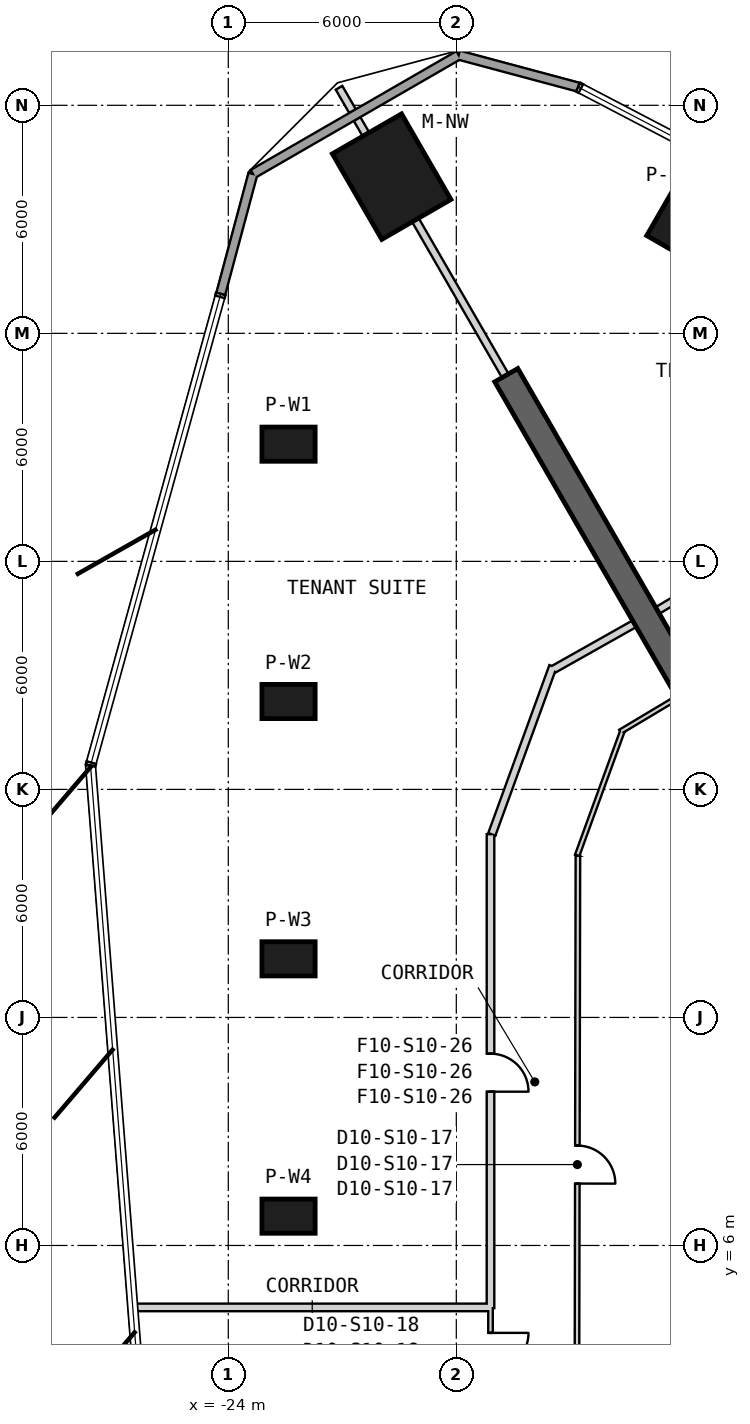
"""IFC4 building model, lengths in metres.
Left out: names, types, materials, properties, quantities, classifications, styles, units other than length and angle.
Written with IfcOpenShell. Run it as: python <this file> out.ifc"""

import sys

from ifc_helpers import new_model, si_unit, direction, frame, frame_2d, origin, origin_2d, place, context, subcontext, project, spatial, rectangle, extrude, element, fill, save


model = new_model("IFC4")
c1 = context("Model", 3, precision=1e-05, world=origin(), true_north=direction((0.0, 1.0)))
c2 = subcontext(c1, "Body", "Model", "MODEL_VIEW")
j1 = project(units=[si_unit("LENGTHUNIT", "METRE"), si_unit("PLANEANGLEUNIT", "RADIAN")], contexts=[c1])
p1 = place(None, origin())
s1 = spatial("IfcSite", under=j1, at=p1, CompositionType="ELEMENT")
p2 = place(p1, origin())
s2 = spatial("IfcBuilding", under=s1, at=p2, CompositionType="ELEMENT")
p3 = place(p2, frame((0.0, 0.0, 181.2)))
s3 = spatial("IfcBuildingStorey", under=s2, at=p3, CompositionType="ELEMENT", Elevation=181.2)
p4 = place(p3, frame((-19.701, 34.124, 0.0), z_axis=(0.0, 0.0, 1.0), x_axis=(-0.5, 0.866025403784, 0.0)))
e1 = element("IfcColumn", 1, at=p4, inside=s3, PredefinedType="COLUMN", context=c2, shape_type="SweptSolid", body=[
    extrude(rectangle(XDim=2.6, YDim=2.1, at=origin_2d()), origin(), (0.0, 0.0, 1.0), 4.0),
])
for number, where, z_axis, x_axis in (
    (2, (-22.415, 27.084, 0.0), (0.0, 0.0, 1.0), (-1.0, 0.0, 0.0)),
    (3, (-22.415, 20.313, 0.0), (0.0, 0.0, 1.0), (-1.0, 0.0, 0.0)),
    (4, (-22.415, 13.542, 0.0), (0.0, 0.0, 1.0), (-1.0, 0.0, 0.0)),
    (5, (-22.415, 6.771, 0.0), (0.0, 0.0, 1.0), (-1.0, 0.0, 0.0)),
    (6, (-12.248, 32.954, 0.0), (0.0, 0.0, 1.0), (0.5, 0.866, 0.0)),
):
    element("IfcColumn", number, at=place(p3, frame(where, z_axis=z_axis, x_axis=x_axis)), inside=s3, PredefinedType="COLUMN", context=c2, shape_type="SweptSolid", body=[
        extrude(rectangle(XDim=1.4, YDim=0.9, at=origin_2d()), origin(), (0.0, 0.0, 1.0), 4.0),
    ])
p5 = place(p3, frame((-10.575, 18.316, 0.0), z_axis=(0.0, 0.0, 1.0), x_axis=(-0.500002625756, 0.866023887798, 0.0)))
e7 = element("IfcWall", 7, at=p5, inside=s3, PredefinedType="SHEAR", context=c2, shape_type="SweptSolid", body=[
    extrude(rectangle(XDim=12.22, YDim=0.7, at=frame_2d((6.11, 0.0))), origin(), (0.0, 0.0, 1.0), 4.0),
])
p6 = place(p3, frame((-14.793, 36.479, 0.0), z_axis=(0.0, 0.0, 1.0), x_axis=(-0.965934328549, 0.258787312151, 0.0)))
e8 = element("IfcWall", 8, at=p6, inside=s3, PredefinedType="SOLIDWALL", context=c2, shape_type="SweptSolid", body=[
    extrude(rectangle(XDim=3.256, YDim=0.24, at=frame_2d((1.628, 0.0))), origin(), (0.0, 0.0, 1.0), 3.7),
])
p7 = place(p3, frame((-17.938, 37.322, 0.0), z_axis=(0.0, 0.0, 1.0), x_axis=(-0.866019130722, -0.500010865105, 0.0)))
e9 = element("IfcWall", 9, at=p7, inside=s3, PredefinedType="SOLIDWALL", context=c2, shape_type="SweptSolid", body=[
    extrude(rectangle(XDim=6.253, YDim=0.24, at=frame_2d((3.126, 0.0))), origin(), (0.0, 0.0, 1.0), 3.7),
])
p8 = place(p3, frame((-23.353, 34.195, 0.0), z_axis=(0.0, 0.0, 1.0), x_axis=(-0.258843094037, -0.965919382076, 0.0)))
e10 = element("IfcWall", 10, at=p8, inside=s3, PredefinedType="SOLIDWALL", context=c2, shape_type="SweptSolid", body=[
    extrude(rectangle(XDim=3.269, YDim=0.24, at=frame_2d((1.635, 0.0))), origin(), (0.0, 0.0, 1.0), 3.7),
])
p9 = place(p3, frame((-12.189, 20.411, 0.0), z_axis=(0.0, 0.0, 1.0), x_axis=(-0.858492721014, -0.51282574815, 0.0)))
e11 = element("IfcWall", 11, at=p9, inside=s3, PredefinedType="PARTITIONING", context=c2, shape_type="SweptSolid", body=[
    extrude(rectangle(XDim=1.742, YDim=0.12, at=frame_2d((0.871, 0.0))), origin(), (0.0, 0.0, 1.0), 3.7),
])
p10 = place(p3, frame((-13.631, 19.53, 0.0), z_axis=(0.0, 0.0, 1.0), x_axis=(-0.342069878069, -0.939674517329, 0.0)))
e12 = element("IfcWall", 12, at=p10, inside=s3, PredefinedType="PARTITIONING", context=c2, shape_type="SweptSolid", body=[
    extrude(rectangle(XDim=3.479, YDim=0.12, at=frame_2d((1.739, 0.0))), origin(), (0.0, 0.0, 1.0), 2.78),
])
p11 = place(p3, frame((-14.8, 16.257, 0.0), z_axis=(0.0, 0.0, 1.0), x_axis=(-0.001847148781, -0.999998294019, 0.0)))
e13 = element("IfcWall", 13, at=p11, inside=s3, PredefinedType="PARTITIONING", context=c2, shape_type="SweptSolid", body=[
    extrude(rectangle(XDim=16.257, YDim=0.12, at=frame_2d((8.128, 0.0))), origin(), (0.0, 0.0, 1.0), 2.88),
])
p12 = place(p11, frame((7.629, 0.0, 0.0)))
e14 = element("IfcOpeningElement", 14, at=p12, cuts=e13, PredefinedType="OPENING", context=c2, shape_type="SweptSolid", body=[
    extrude(rectangle(XDim=1.0, YDim=2.1, at=frame_2d((0.5, 1.05))), frame((0.0, 0.07, 0.0), z_axis=(0.0, -1.0, 0.0), x_axis=(1.0, 0.0, 0.0)), (0.0, 0.0, 1.0), 0.14),
])
p13 = place(p3, frame((-17.1, 4.35, 0.0), z_axis=(0.0, 0.0, 1.0), x_axis=(0.0, -1.0, 0.0)))
e15 = element("IfcWall", 15, at=p13, inside=s3, PredefinedType="PARTITIONING", context=c2, shape_type="SweptSolid", body=[
    extrude(rectangle(XDim=2.3, YDim=0.12, at=frame_2d((1.15, 0.0))), origin(), (0.0, 0.0, 1.0), 3.7),
])
p14 = place(p13, frame((0.65, 0.0, 0.0)))
e16 = element("IfcOpeningElement", 16, at=p14, cuts=e15, PredefinedType="OPENING", context=c2, shape_type="SweptSolid", body=[
    extrude(rectangle(XDim=1.0, YDim=2.1, at=frame_2d((0.5, 1.05))), frame((0.0, 0.07, 0.0), z_axis=(0.0, -1.0, 0.0), x_axis=(1.0, 0.0, 0.0)), (0.0, 0.0, 1.0), 0.14),
])
p15 = place(p3, frame((-17.1, 16.823, 0.0), z_axis=(0.0, 0.0, 1.0), x_axis=(0.0, -1.0, 0.0)))
e17 = element("IfcWall", 17, at=p15, inside=s3, PredefinedType="PARTITIONING", context=c2, shape_type="SweptSolid", body=[
    extrude(rectangle(XDim=12.473, YDim=0.2, at=frame_2d((6.236, 0.0))), origin(), (0.0, 0.0, 1.0), 2.88),
])
p16 = place(p15, frame((5.776, 0.0, 0.0)))
e18 = element("IfcOpeningElement", 18, at=p16, cuts=e17, PredefinedType="OPENING", context=c2, shape_type="SweptSolid", body=[
    extrude(rectangle(XDim=1.0, YDim=2.1, at=frame_2d((0.5, 1.05))), frame((0.0, 0.11, 0.0), z_axis=(0.0, -1.0, 0.0), x_axis=(1.0, 0.0, 0.0)), (0.0, 0.0, 1.0), 0.22),
])
p17 = place(p3, frame((-15.456, 21.239, 0.0), z_axis=(0.0, 0.0, 1.0), x_axis=(-0.34205546997, -0.939679762187, 0.0)))
e19 = element("IfcWall", 19, at=p17, inside=s3, PredefinedType="PARTITIONING", context=c2, shape_type="SweptSolid", body=[
    extrude(rectangle(XDim=4.706, YDim=0.2, at=frame_2d((2.353, 0.0))), origin(), (0.0, 0.0, 1.0), 2.78),
])
p18 = place(p3, frame((-13.313, 22.359, 0.0), z_axis=(0.0, 0.0, 1.0), x_axis=(-0.87121710687, -0.490897904555, 0.0)))
e20 = element("IfcWall", 20, at=p18, inside=s3, PredefinedType="PARTITIONING", context=c2, shape_type="SweptSolid", body=[
    extrude(rectangle(XDim=2.457, YDim=0.2, at=frame_2d((1.229, 0.0))), origin(), (0.0, 0.0, 1.0), 3.7),
])
p19 = place(p3, frame((-10.449, 24.044, 0.0), z_axis=(0.0, 0.0, 1.0), x_axis=(-0.860744847861, -0.509036645912, 0.0)))
e21 = element("IfcWall", 21, at=p19, inside=s3, PredefinedType="PARTITIONING", context=c2, shape_type="SweptSolid", body=[
    extrude(rectangle(XDim=2.623, YDim=0.2, at=frame_2d((1.311, 0.0))), origin(), (0.0, 0.0, 1.0), 3.7),
])
p20 = place(p3, frame((-17.16, 4.37, 0.0), z_axis=(0.0, 0.0, 1.0), x_axis=(-1.0, 0.0, 0.0)))
e22 = element("IfcWall", 22, at=p20, inside=s3, PredefinedType="PARTITIONING", context=c2, shape_type="SweptSolid", body=[
    extrude(rectangle(XDim=9.354, YDim=0.2, at=frame_2d((4.677, 0.0))), origin(), (0.0, 0.0, 1.0), 3.7),
])
p21 = place(p3, frame((-21.086, 36.462, 0.0), z_axis=(0.0, 0.0, 1.0), x_axis=(0.499801860585, -0.866139769411, 0.0)))
e23 = element("IfcWall", 23, at=p21, inside=s3, PredefinedType="PARTITIONING", context=c2, shape_type="SweptSolid", body=[
    extrude(rectangle(XDim=0.71, YDim=0.2, at=frame_2d((0.355, 0.0))), origin(), (0.0, 0.0, 1.0), 3.7),
])
p22 = place(p3, frame((-20.611, 35.64, 0.0), z_axis=(0.0, 0.0, 1.0), x_axis=(0.499842898591, -0.866116087328, 0.0)))
e24 = element("IfcWall", 24, at=p22, inside=s3, PredefinedType="PARTITIONING", context=c2, shape_type="SweptSolid", body=[
    extrude(rectangle(XDim=0.468, YDim=0.2, at=frame_2d((0.234, 0.0))), origin(), (0.0, 0.0, 1.0), 3.7),
])
p23 = place(p3, frame((-19.077, 32.983, 0.0), z_axis=(0.0, 0.0, 1.0), x_axis=(0.499978475836, -0.86603783041, 0.0)))
e25 = element("IfcWall", 25, at=p23, inside=s3, PredefinedType="PARTITIONING", context=c2, shape_type="SweptSolid", body=[
    extrude(rectangle(XDim=4.733, YDim=0.2, at=frame_2d((2.366, 0.0))), origin(), (0.0, 0.0, 1.0), 3.27),
])
p24 = place(p12, origin())
e26 = element("IfcDoor", 26, at=p24, inside=s3, OperationType="SINGLE_SWING_LEFT", PredefinedType="NOTDEFINED", context=c2, shape_type="SweptSolid", body=[
    extrude(rectangle(XDim=1.0, YDim=2.1, at=frame_2d((0.5, 1.05))), frame((0.0, 0.025, 0.0), z_axis=(0.0, -1.0, 0.0), x_axis=(1.0, 0.0, 0.0)), (0.0, 0.0, 1.0), 0.05),
])
fill(e14, e26)
p25 = place(p14, origin())
e27 = element("IfcDoor", 27, at=p25, inside=s3, OperationType="SINGLE_SWING_RIGHT", PredefinedType="NOTDEFINED", context=c2, shape_type="SweptSolid", body=[
    extrude(rectangle(XDim=1.0, YDim=2.1, at=frame_2d((0.5, 1.05))), frame((0.0, 0.025, 0.0), z_axis=(0.0, -1.0, 0.0), x_axis=(1.0, 0.0, 0.0)), (0.0, 0.0, 1.0), 0.05),
])
fill(e16, e27)
p26 = place(p16, origin())
e28 = element("IfcDoor", 28, at=p26, inside=s3, OperationType="SINGLE_SWING_RIGHT", PredefinedType="USERDEFINED", context=c2, shape_type="SweptSolid", body=[
    extrude(rectangle(XDim=1.0, YDim=2.1, at=frame_2d((0.5, 1.05))), frame((0.0, 0.025, 0.0), z_axis=(0.0, -1.0, 0.0), x_axis=(1.0, 0.0, 0.0)), (0.0, 0.0, 1.0), 0.05),
])
fill(e18, e28)
save(model, sys.argv[1])
